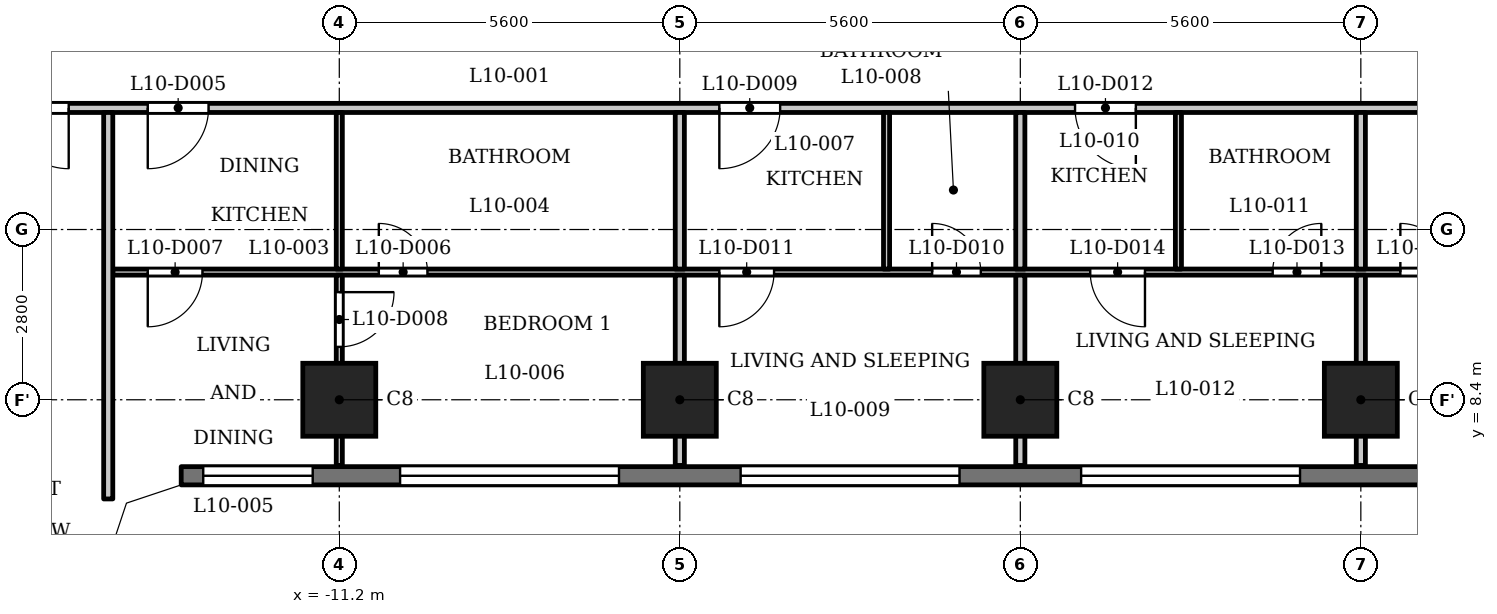
"""IFC4 building model, lengths in metres.
Left out: names, types, materials, properties, quantities, classifications, styles, units other than length and angle.
Written with IfcOpenShell. Run it as: python <this file> out.ifc"""

import sys

from ifc_helpers import new_model, si_unit, direction, frame, frame_2d, origin, origin_2d, place, context, subcontext, project, spatial, polyline, rectangle, outline, extrude, element, fill, save


model = new_model("IFC4")
c1 = context("Model", 3, precision=1e-05, world=origin(), true_north=direction((0.0, 1.0)))
c2 = subcontext(c1, "Body", "Model", "MODEL_VIEW")
j1 = project(units=[si_unit("LENGTHUNIT", "METRE"), si_unit("PLANEANGLEUNIT", "RADIAN")], contexts=[c1])
p1 = place(None, origin())
s1 = spatial("IfcSite", under=j1, at=p1, CompositionType="ELEMENT")
p2 = place(p1, origin())
s2 = spatial("IfcBuilding", under=s1, at=p2, CompositionType="ELEMENT")
p3 = place(p2, frame((0.0, 0.0, 44.5)))
s3 = spatial("IfcBuildingStorey", under=s2, at=p3, CompositionType="ELEMENT", Elevation=44.5)
for number, where, z_axis, x_axis in (
    (1, (-11.2, 8.4, 0.0), (0.0, 0.0, 1.0), (1.0, 0.0, 0.0)),
    (2, (-5.6, 8.4, 0.0), (0.0, 0.0, 1.0), (1.0, 0.0, 0.0)),
    (3, (0.0, 8.4, 0.0), (0.0, 0.0, 1.0), (1.0, 0.0, 0.0)),
    (4, (5.6, 8.4, 0.0), (0.0, 0.0, 1.0), (1.0, 0.0, 0.0)),
):
    element("IfcColumn", number, at=place(p3, frame(where, z_axis=z_axis, x_axis=x_axis)), inside=s3, PredefinedType="COLUMN", context=c2, shape_type="SweptSolid", body=[
        extrude(rectangle(XDim=1.2, YDim=1.2, at=origin_2d()), origin(), (0.0, 0.0, 1.0), 3.5),
    ])
p4 = place(p3, frame((-13.8, 7.15, 0.0), z_axis=(0.0, 0.0, 1.0), x_axis=(1.0, 0.0, 0.0)))
e5 = element("IfcWall", 5, at=p4, inside=s3, PredefinedType="SOLIDWALL", context=c2, shape_type="SweptSolid", body=[
    extrude(rectangle(XDim=27.6, YDim=0.3, at=frame_2d((13.8, 0.0))), origin(), (0.0, 0.0, 1.0), 3.2),
])
p5 = place(p4, frame((0.363, 0.0, 0.9)))
e6 = element("IfcOpeningElement", 6, at=p5, cuts=e5, PredefinedType="OPENING", context=c2, shape_type="SweptSolid", body=[
    extrude(rectangle(XDim=1.8, YDim=1.25, at=frame_2d((0.9, 0.625))), frame((0.0, 0.16, 0.0), z_axis=(0.0, -1.0, 0.0), x_axis=(1.0, 0.0, 0.0)), (0.0, 0.0, 1.0), 0.32),
])
p6 = place(p4, frame((3.6, 0.0, 1.2)))
e7 = element("IfcOpeningElement", 7, at=p6, cuts=e5, PredefinedType="OPENING", context=c2, shape_type="SweptSolid", body=[
    extrude(rectangle(XDim=3.6, YDim=0.95, at=frame_2d((1.8, 0.475))), frame((0.0, 0.16, 0.0), z_axis=(0.0, -1.0, 0.0), x_axis=(1.0, 0.0, 0.0)), (0.0, 0.0, 1.0), 0.32),
])
p7 = place(p4, frame((9.2, 0.0, 1.2)))
e8 = element("IfcOpeningElement", 8, at=p7, cuts=e5, PredefinedType="OPENING", context=c2, shape_type="SweptSolid", body=[
    extrude(rectangle(XDim=3.6, YDim=0.95, at=frame_2d((1.8, 0.475))), frame((0.0, 0.16, 0.0), z_axis=(0.0, -1.0, 0.0), x_axis=(1.0, 0.0, 0.0)), (0.0, 0.0, 1.0), 0.32),
])
p8 = place(p4, frame((14.8, 0.0, 1.2)))
e9 = element("IfcOpeningElement", 9, at=p8, cuts=e5, PredefinedType="OPENING", context=c2, shape_type="SweptSolid", body=[
    extrude(rectangle(XDim=3.6, YDim=0.95, at=frame_2d((1.8, 0.475))), frame((0.0, 0.16, 0.0), z_axis=(0.0, -1.0, 0.0), x_axis=(1.0, 0.0, 0.0)), (0.0, 0.0, 1.0), 0.32),
])
p9 = place(p4, frame((20.4, 0.0, 1.2)))
e10 = element("IfcOpeningElement", 10, at=p9, cuts=e5, PredefinedType="OPENING", context=c2, shape_type="SweptSolid", body=[
    extrude(rectangle(XDim=3.6, YDim=0.95, at=frame_2d((1.8, 0.475))), frame((0.0, 0.16, 0.0), z_axis=(0.0, -1.0, 0.0), x_axis=(1.0, 0.0, 0.0)), (0.0, 0.0, 1.0), 0.32),
])
p10 = place(p4, frame((25.438, 0.0, 0.9)))
e11 = element("IfcOpeningElement", 11, at=p10, cuts=e5, PredefinedType="OPENING", context=c2, shape_type="SweptSolid", body=[
    extrude(rectangle(XDim=1.8, YDim=1.25, at=frame_2d((0.9, 0.625))), frame((0.0, 0.16, 0.0), z_axis=(0.0, -1.0, 0.0), x_axis=(1.0, 0.0, 0.0)), (0.0, 0.0, 1.0), 0.32),
])
p11 = place(p3, frame((-14.925, 10.5, 0.0), z_axis=(0.0, 0.0, 1.0), x_axis=(1.0, 0.0, 0.0)))
e12 = element("IfcWall", 12, at=p11, inside=s3, PredefinedType="PARTITIONING", context=c2, shape_type="SweptSolid", body=[
    extrude(rectangle(XDim=29.85, YDim=0.1, at=frame_2d((14.925, 0.0))), origin(), (0.0, 0.0, 1.0), 3.2),
])
p12 = place(p11, frame((4.375, 0.0, 0.0)))
e13 = element("IfcOpeningElement", 13, at=p12, cuts=e12, PredefinedType="OPENING", context=c2, shape_type="SweptSolid", body=[
    extrude(rectangle(XDim=0.8, YDim=2.1, at=frame_2d((0.4, 1.05))), frame((0.0, 0.06, 0.0), z_axis=(0.0, -1.0, 0.0), x_axis=(1.0, 0.0, 0.0)), (0.0, 0.0, 1.0), 0.12),
])
p13 = place(p11, frame((0.575, 0.0, 0.0)))
e14 = element("IfcOpeningElement", 14, at=p13, cuts=e12, PredefinedType="OPENING", context=c2, shape_type="SweptSolid", body=[
    extrude(rectangle(XDim=0.9, YDim=2.1, at=frame_2d((0.45, 1.05))), frame((0.0, 0.06, 0.0), z_axis=(0.0, -1.0, 0.0), x_axis=(1.0, 0.0, 0.0)), (0.0, 0.0, 1.0), 0.12),
])
p14 = place(p11, frame((13.475, 0.0, 0.0)))
e15 = element("IfcOpeningElement", 15, at=p14, cuts=e12, PredefinedType="OPENING", context=c2, shape_type="SweptSolid", body=[
    extrude(rectangle(XDim=0.8, YDim=2.1, at=frame_2d((0.4, 1.05))), frame((0.0, 0.06, 0.0), z_axis=(0.0, -1.0, 0.0), x_axis=(1.0, 0.0, 0.0)), (0.0, 0.0, 1.0), 0.12),
])
p15 = place(p11, frame((9.975, 0.0, 0.0)))
e16 = element("IfcOpeningElement", 16, at=p15, cuts=e12, PredefinedType="OPENING", context=c2, shape_type="SweptSolid", body=[
    extrude(rectangle(XDim=0.9, YDim=2.1, at=frame_2d((0.45, 1.05))), frame((0.0, 0.06, 0.0), z_axis=(0.0, -1.0, 0.0), x_axis=(1.0, 0.0, 0.0)), (0.0, 0.0, 1.0), 0.12),
])
p16 = place(p11, frame((19.075, 0.0, 0.0)))
e17 = element("IfcOpeningElement", 17, at=p16, cuts=e12, PredefinedType="OPENING", context=c2, shape_type="SweptSolid", body=[
    extrude(rectangle(XDim=0.8, YDim=2.1, at=frame_2d((0.4, 1.05))), frame((0.0, 0.06, 0.0), z_axis=(0.0, -1.0, 0.0), x_axis=(1.0, 0.0, 0.0)), (0.0, 0.0, 1.0), 0.12),
])
p17 = place(p11, frame((16.075, 0.0, 0.0)))
e18 = element("IfcOpeningElement", 18, at=p17, cuts=e12, PredefinedType="OPENING", context=c2, shape_type="SweptSolid", body=[
    extrude(rectangle(XDim=0.9, YDim=2.1, at=frame_2d((0.45, 1.05))), frame((0.0, 0.06, 0.0), z_axis=(0.0, -1.0, 0.0), x_axis=(1.0, 0.0, 0.0)), (0.0, 0.0, 1.0), 0.12),
])
p18 = place(p11, frame((21.175, 0.0, 0.0)))
e19 = element("IfcOpeningElement", 19, at=p18, cuts=e12, PredefinedType="OPENING", context=c2, shape_type="SweptSolid", body=[
    extrude(rectangle(XDim=0.8, YDim=2.1, at=frame_2d((0.4, 1.05))), frame((0.0, 0.06, 0.0), z_axis=(0.0, -1.0, 0.0), x_axis=(1.0, 0.0, 0.0)), (0.0, 0.0, 1.0), 0.12),
])
p19 = place(p11, frame((26.775, 0.0, 0.0)))
e20 = element("IfcOpeningElement", 20, at=p19, cuts=e12, PredefinedType="OPENING", context=c2, shape_type="SweptSolid", body=[
    extrude(rectangle(XDim=0.9, YDim=2.1, at=frame_2d((0.45, 1.05))), frame((0.0, 0.06, 0.0), z_axis=(0.0, -1.0, 0.0), x_axis=(1.0, 0.0, 0.0)), (0.0, 0.0, 1.0), 0.12),
])
p20 = place(p3, frame((-17.4, 13.2, 0.0), z_axis=(0.0, 0.0, 1.0), x_axis=(1.0, 0.0, 0.0)))
e21 = element("IfcWall", 21, at=p20, inside=s3, PredefinedType="PARTITIONING", context=c2, shape_type="SweptSolid", body=[
    extrude(rectangle(XDim=34.8, YDim=0.15, at=frame_2d((17.4, 0.0))), origin(), (0.0, 0.0, 1.0), 3.2),
])
p21 = place(p20, frame((0.75, 0.0, 0.0)))
e22 = element("IfcOpeningElement", 22, at=p21, cuts=e21, PredefinedType="OPENING", context=c2, shape_type="SweptSolid", body=[
    extrude(rectangle(XDim=1.0, YDim=2.1, at=frame_2d((0.5, 1.05))), frame((0.0, 0.085, 0.0), z_axis=(0.0, -1.0, 0.0), x_axis=(1.0, 0.0, 0.0)), (0.0, 0.0, 1.0), 0.17),
])
p22 = place(p20, frame((33.15, 0.0, 0.0)))
e23 = element("IfcOpeningElement", 23, at=p22, cuts=e21, PredefinedType="OPENING", context=c2, shape_type="SweptSolid", body=[
    extrude(rectangle(XDim=1.0, YDim=2.1, at=frame_2d((0.5, 1.05))), frame((0.0, 0.085, 0.0), z_axis=(0.0, -1.0, 0.0), x_axis=(1.0, 0.0, 0.0)), (0.0, 0.0, 1.0), 0.17),
])
p23 = place(p20, frame((3.05, 0.0, 0.0)))
e24 = element("IfcOpeningElement", 24, at=p23, cuts=e21, PredefinedType="OPENING", context=c2, shape_type="SweptSolid", body=[
    extrude(rectangle(XDim=1.0, YDim=2.1, at=frame_2d((0.5, 1.05))), frame((0.0, 0.085, 0.0), z_axis=(0.0, -1.0, 0.0), x_axis=(1.0, 0.0, 0.0)), (0.0, 0.0, 1.0), 0.17),
])
p24 = place(p20, frame((12.45, 0.0, 0.0)))
e25 = element("IfcOpeningElement", 25, at=p24, cuts=e21, PredefinedType="OPENING", context=c2, shape_type="SweptSolid", body=[
    extrude(rectangle(XDim=1.0, YDim=2.1, at=frame_2d((0.5, 1.05))), frame((0.0, 0.085, 0.0), z_axis=(0.0, -1.0, 0.0), x_axis=(1.0, 0.0, 0.0)), (0.0, 0.0, 1.0), 0.17),
])
p25 = place(p20, frame((18.3, 0.0, 0.0)))
e26 = element("IfcOpeningElement", 26, at=p25, cuts=e21, PredefinedType="OPENING", context=c2, shape_type="SweptSolid", body=[
    extrude(rectangle(XDim=1.0, YDim=2.1, at=frame_2d((0.5, 1.05))), frame((0.0, 0.085, 0.0), z_axis=(0.0, -1.0, 0.0), x_axis=(1.0, 0.0, 0.0)), (0.0, 0.0, 1.0), 0.17),
])
p26 = place(p20, frame((29.25, 0.0, 0.0)))
e27 = element("IfcOpeningElement", 27, at=p26, cuts=e21, PredefinedType="OPENING", context=c2, shape_type="SweptSolid", body=[
    extrude(rectangle(XDim=1.0, YDim=2.1, at=frame_2d((0.5, 1.05))), frame((0.0, 0.085, 0.0), z_axis=(0.0, -1.0, 0.0), x_axis=(1.0, 0.0, 0.0)), (0.0, 0.0, 1.0), 0.17),
])
p27 = place(p3, frame((-15.0, 6.769, 0.0), z_axis=(0.0, 0.0, 1.0), x_axis=(0.0, 1.0, 0.0)))
e28 = element("IfcWall", 28, at=p27, inside=s3, PredefinedType="PARTITIONING", context=c2, shape_type="SweptSolid", body=[
    extrude(rectangle(XDim=6.356, YDim=0.15, at=frame_2d((3.178, 0.0))), origin(), (0.0, 0.0, 1.0), 3.2),
])
p28 = place(p3, frame((-11.2, 7.32, 0.0), z_axis=(0.0, 0.0, 1.0), x_axis=(0.0, 1.0, 0.0)))
e29 = element("IfcWall", 29, at=p28, inside=s3, PredefinedType="PARTITIONING", context=c2, shape_type="SweptSolid", body=[
    extrude(rectangle(XDim=3.13, YDim=0.1, at=frame_2d((1.565, 0.0))), origin(), (0.0, 0.0, 1.0), 3.2),
])
p29 = place(p28, frame((1.95, 0.0, 0.0)))
e30 = element("IfcOpeningElement", 30, at=p29, cuts=e29, PredefinedType="OPENING", context=c2, shape_type="SweptSolid", body=[
    extrude(rectangle(XDim=0.9, YDim=2.1, at=frame_2d((0.45, 1.05))), frame((0.0, 0.06, 0.0), z_axis=(0.0, -1.0, 0.0), x_axis=(1.0, 0.0, 0.0)), (0.0, 0.0, 1.0), 0.12),
])
p30 = place(p3, frame((-11.2, 10.55, 0.0), z_axis=(0.0, 0.0, 1.0), x_axis=(0.0, 1.0, 0.0)))
e31 = element("IfcWall", 31, at=p30, inside=s3, PredefinedType="PARTITIONING", context=c2, shape_type="SweptSolid", body=[
    extrude(rectangle(XDim=2.575, YDim=0.1, at=frame_2d((1.288, 0.0))), origin(), (0.0, 0.0, 1.0), 3.2),
])
p31 = place(p3, frame((-5.6, 7.32, 0.0), z_axis=(0.0, 0.0, 1.0), x_axis=(0.0, 1.0, 0.0)))
e32 = element("IfcWall", 32, at=p31, inside=s3, PredefinedType="PARTITIONING", context=c2, shape_type="SweptSolid", body=[
    extrude(rectangle(XDim=3.13, YDim=0.15, at=frame_2d((1.565, 0.0))), origin(), (0.0, 0.0, 1.0), 3.2),
])
p32 = place(p3, frame((-5.6, 10.55, 0.0), z_axis=(0.0, 0.0, 1.0), x_axis=(0.0, 1.0, 0.0)))
e33 = element("IfcWall", 33, at=p32, inside=s3, PredefinedType="PARTITIONING", context=c2, shape_type="SweptSolid", body=[
    extrude(rectangle(XDim=2.575, YDim=0.15, at=frame_2d((1.288, 0.0))), origin(), (0.0, 0.0, 1.0), 3.2),
])
p33 = place(p3, frame((-2.2, 10.55, 0.0), z_axis=(0.0, 0.0, 1.0), x_axis=(0.0, 1.0, 0.0)))
e34 = element("IfcWall", 34, at=p33, inside=s3, PredefinedType="PARTITIONING", context=c2, shape_type="SweptSolid", body=[
    extrude(rectangle(XDim=2.575, YDim=0.1, at=frame_2d((1.288, 0.0))), origin(), (0.0, 0.0, 1.0), 3.2),
])
p34 = place(p3, frame((0.0, 7.32, 0.0), z_axis=(0.0, 0.0, 1.0), x_axis=(0.0, 1.0, 0.0)))
e35 = element("IfcWall", 35, at=p34, inside=s3, PredefinedType="PARTITIONING", context=c2, shape_type="SweptSolid", body=[
    extrude(rectangle(XDim=3.13, YDim=0.15, at=frame_2d((1.565, 0.0))), origin(), (0.0, 0.0, 1.0), 3.2),
])
p35 = place(p3, frame((0.0, 10.55, 0.0), z_axis=(0.0, 0.0, 1.0), x_axis=(0.0, 1.0, 0.0)))
e36 = element("IfcWall", 36, at=p35, inside=s3, PredefinedType="PARTITIONING", context=c2, shape_type="SweptSolid", body=[
    extrude(rectangle(XDim=2.575, YDim=0.15, at=frame_2d((1.288, 0.0))), origin(), (0.0, 0.0, 1.0), 3.2),
])
p36 = place(p3, frame((2.6, 10.55, 0.0), z_axis=(0.0, 0.0, 1.0), x_axis=(0.0, 1.0, 0.0)))
e37 = element("IfcWall", 37, at=p36, inside=s3, PredefinedType="PARTITIONING", context=c2, shape_type="SweptSolid", body=[
    extrude(rectangle(XDim=2.575, YDim=0.1, at=frame_2d((1.288, 0.0))), origin(), (0.0, 0.0, 1.0), 3.2),
])
p37 = place(p3, frame((5.6, 7.32, 0.0), z_axis=(0.0, 0.0, 1.0), x_axis=(0.0, 1.0, 0.0)))
e38 = element("IfcWall", 38, at=p37, inside=s3, PredefinedType="PARTITIONING", context=c2, shape_type="SweptSolid", body=[
    extrude(rectangle(XDim=3.13, YDim=0.15, at=frame_2d((1.565, 0.0))), origin(), (0.0, 0.0, 1.0), 3.2),
])
p38 = place(p3, frame((5.6, 10.55, 0.0), z_axis=(0.0, 0.0, 1.0), x_axis=(0.0, 1.0, 0.0)))
e39 = element("IfcWall", 39, at=p38, inside=s3, PredefinedType="PARTITIONING", context=c2, shape_type="SweptSolid", body=[
    extrude(rectangle(XDim=2.575, YDim=0.15, at=frame_2d((1.288, 0.0))), origin(), (0.0, 0.0, 1.0), 3.2),
])
p39 = place(p3, origin())
e40 = element("IfcWall", 40, at=p39, inside=s3, PredefinedType="SOLIDWALL", context=c2, shape_type="SweptSolid", body=[
    extrude(outline(polyline([(-13.849, 7.3), (-14.937, 6.937), (-15.3, 5.849), (-15.3, 5.8), (-15.0, 5.8), (-14.7, 6.7), (-13.8, 7.0), (-13.8, 7.3), (-13.849, 7.3)])), origin(), (0.0, 0.0, 1.0), 3.2),
])
p40 = place(p21, origin())
e41 = element("IfcDoor", 41, at=p40, inside=s3, OperationType="SINGLE_SWING_RIGHT", PredefinedType="DOOR", context=c2, shape_type="SweptSolid", body=[
    extrude(rectangle(XDim=1.0, YDim=2.1, at=frame_2d((0.5, 1.05))), frame((0.0, 0.025, 0.0), z_axis=(0.0, -1.0, 0.0), x_axis=(1.0, 0.0, 0.0)), (0.0, 0.0, 1.0), 0.05),
])
fill(e22, e41)
p41 = place(p23, origin())
e42 = element("IfcDoor", 42, at=p41, inside=s3, OperationType="SINGLE_SWING_LEFT", PredefinedType="DOOR", context=c2, shape_type="SweptSolid", body=[
    extrude(rectangle(XDim=1.0, YDim=2.1, at=frame_2d((0.5, 1.05))), frame((0.0, 0.025, 0.0), z_axis=(0.0, -1.0, 0.0), x_axis=(1.0, 0.0, 0.0)), (0.0, 0.0, 1.0), 0.05),
])
fill(e24, e42)
p42 = place(p12, origin())
e43 = element("IfcDoor", 43, at=p42, inside=s3, OperationType="SINGLE_SWING_RIGHT", PredefinedType="DOOR", context=c2, shape_type="SweptSolid", body=[
    extrude(rectangle(XDim=0.8, YDim=2.1, at=frame_2d((0.4, 1.05))), frame((0.0, 0.025, 0.0), z_axis=(0.0, -1.0, 0.0), x_axis=(1.0, 0.0, 0.0)), (0.0, 0.0, 1.0), 0.05),
])
fill(e13, e43)
p43 = place(p13, origin())
e44 = element("IfcDoor", 44, at=p43, inside=s3, OperationType="SINGLE_SWING_LEFT", PredefinedType="DOOR", context=c2, shape_type="SweptSolid", body=[
    extrude(rectangle(XDim=0.9, YDim=2.1, at=frame_2d((0.45, 1.05))), frame((0.0, 0.025, 0.0), z_axis=(0.0, -1.0, 0.0), x_axis=(1.0, 0.0, 0.0)), (0.0, 0.0, 1.0), 0.05),
])
fill(e14, e44)
p44 = place(p29, origin())
e45 = element("IfcDoor", 45, at=p44, inside=s3, OperationType="SINGLE_SWING_RIGHT", PredefinedType="DOOR", context=c2, shape_type="SweptSolid", body=[
    extrude(rectangle(XDim=0.9, YDim=2.1, at=frame_2d((0.45, 1.05))), frame((0.0, 0.025, 0.0), z_axis=(0.0, -1.0, 0.0), x_axis=(1.0, 0.0, 0.0)), (0.0, 0.0, 1.0), 0.05),
])
fill(e30, e45)
p45 = place(p24, origin())
e46 = element("IfcDoor", 46, at=p45, inside=s3, OperationType="SINGLE_SWING_LEFT", PredefinedType="DOOR", context=c2, shape_type="SweptSolid", body=[
    extrude(rectangle(XDim=1.0, YDim=2.1, at=frame_2d((0.5, 1.05))), frame((0.0, 0.025, 0.0), z_axis=(0.0, -1.0, 0.0), x_axis=(1.0, 0.0, 0.0)), (0.0, 0.0, 1.0), 0.05),
])
fill(e25, e46)
p46 = place(p14, origin())
e47 = element("IfcDoor", 47, at=p46, inside=s3, OperationType="SINGLE_SWING_RIGHT", PredefinedType="DOOR", context=c2, shape_type="SweptSolid", body=[
    extrude(rectangle(XDim=0.8, YDim=2.1, at=frame_2d((0.4, 1.05))), frame((0.0, 0.025, 0.0), z_axis=(0.0, -1.0, 0.0), x_axis=(1.0, 0.0, 0.0)), (0.0, 0.0, 1.0), 0.05),
])
fill(e15, e47)
p47 = place(p15, origin())
e48 = element("IfcDoor", 48, at=p47, inside=s3, OperationType="SINGLE_SWING_LEFT", PredefinedType="DOOR", context=c2, shape_type="SweptSolid", body=[
    extrude(rectangle(XDim=0.9, YDim=2.1, at=frame_2d((0.45, 1.05))), frame((0.0, 0.025, 0.0), z_axis=(0.0, -1.0, 0.0), x_axis=(1.0, 0.0, 0.0)), (0.0, 0.0, 1.0), 0.05),
])
fill(e16, e48)
p48 = place(p25, origin())
e49 = element("IfcDoor", 49, at=p48, inside=s3, OperationType="SINGLE_SWING_RIGHT", PredefinedType="DOOR", context=c2, shape_type="SweptSolid", body=[
    extrude(rectangle(XDim=1.0, YDim=2.1, at=frame_2d((0.5, 1.05))), frame((0.0, 0.025, 0.0), z_axis=(0.0, -1.0, 0.0), x_axis=(1.0, 0.0, 0.0)), (0.0, 0.0, 1.0), 0.05),
])
fill(e26, e49)
p49 = place(p16, origin())
e50 = element("IfcDoor", 50, at=p49, inside=s3, OperationType="SINGLE_SWING_LEFT", PredefinedType="DOOR", context=c2, shape_type="SweptSolid", body=[
    extrude(rectangle(XDim=0.8, YDim=2.1, at=frame_2d((0.4, 1.05))), frame((0.0, 0.025, 0.0), z_axis=(0.0, -1.0, 0.0), x_axis=(1.0, 0.0, 0.0)), (0.0, 0.0, 1.0), 0.05),
])
fill(e17, e50)
p50 = place(p17, origin())
e51 = element("IfcDoor", 51, at=p50, inside=s3, OperationType="SINGLE_SWING_RIGHT", PredefinedType="DOOR", context=c2, shape_type="SweptSolid", body=[
    extrude(rectangle(XDim=0.9, YDim=2.1, at=frame_2d((0.45, 1.05))), frame((0.0, 0.025, 0.0), z_axis=(0.0, -1.0, 0.0), x_axis=(1.0, 0.0, 0.0)), (0.0, 0.0, 1.0), 0.05),
])
fill(e18, e51)
p51 = place(p18, origin())
e52 = element("IfcDoor", 52, at=p51, inside=s3, OperationType="SINGLE_SWING_RIGHT", PredefinedType="DOOR", context=c2, shape_type="SweptSolid", body=[
    extrude(rectangle(XDim=0.8, YDim=2.1, at=frame_2d((0.4, 1.05))), frame((0.0, 0.025, 0.0), z_axis=(0.0, -1.0, 0.0), x_axis=(1.0, 0.0, 0.0)), (0.0, 0.0, 1.0), 0.05),
])
fill(e19, e52)
p52 = place(p5, origin())
e53 = element("IfcWindow", 53, at=p52, inside=s3, PartitioningType="SINGLE_PANEL", PredefinedType="WINDOW", context=c2, shape_type="SweptSolid", body=[
    extrude(rectangle(XDim=1.8, YDim=1.25, at=frame_2d((0.9, 0.625))), frame((0.0, 0.03, 0.0), z_axis=(0.0, -1.0, 0.0), x_axis=(1.0, 0.0, 0.0)), (0.0, 0.0, 1.0), 0.06),
])
fill(e6, e53)
p53 = place(p6, origin())
e54 = element("IfcWindow", 54, at=p53, inside=s3, PartitioningType="SINGLE_PANEL", PredefinedType="WINDOW", context=c2, shape_type="SweptSolid", body=[
    extrude(rectangle(XDim=3.6, YDim=0.95, at=frame_2d((1.8, 0.475))), frame((0.0, 0.03, 0.0), z_axis=(0.0, -1.0, 0.0), x_axis=(1.0, 0.0, 0.0)), (0.0, 0.0, 1.0), 0.06),
])
fill(e7, e54)
p54 = place(p7, origin())
e55 = element("IfcWindow", 55, at=p54, inside=s3, PartitioningType="SINGLE_PANEL", PredefinedType="WINDOW", context=c2, shape_type="SweptSolid", body=[
    extrude(rectangle(XDim=3.6, YDim=0.95, at=frame_2d((1.8, 0.475))), frame((0.0, 0.03, 0.0), z_axis=(0.0, -1.0, 0.0), x_axis=(1.0, 0.0, 0.0)), (0.0, 0.0, 1.0), 0.06),
])
fill(e8, e55)
p55 = place(p8, origin())
e56 = element("IfcWindow", 56, at=p55, inside=s3, PartitioningType="SINGLE_PANEL", PredefinedType="WINDOW", context=c2, shape_type="SweptSolid", body=[
    extrude(rectangle(XDim=3.6, YDim=0.95, at=frame_2d((1.8, 0.475))), frame((0.0, 0.03, 0.0), z_axis=(0.0, -1.0, 0.0), x_axis=(1.0, 0.0, 0.0)), (0.0, 0.0, 1.0), 0.06),
])
fill(e9, e56)
save(model, sys.argv[1])
